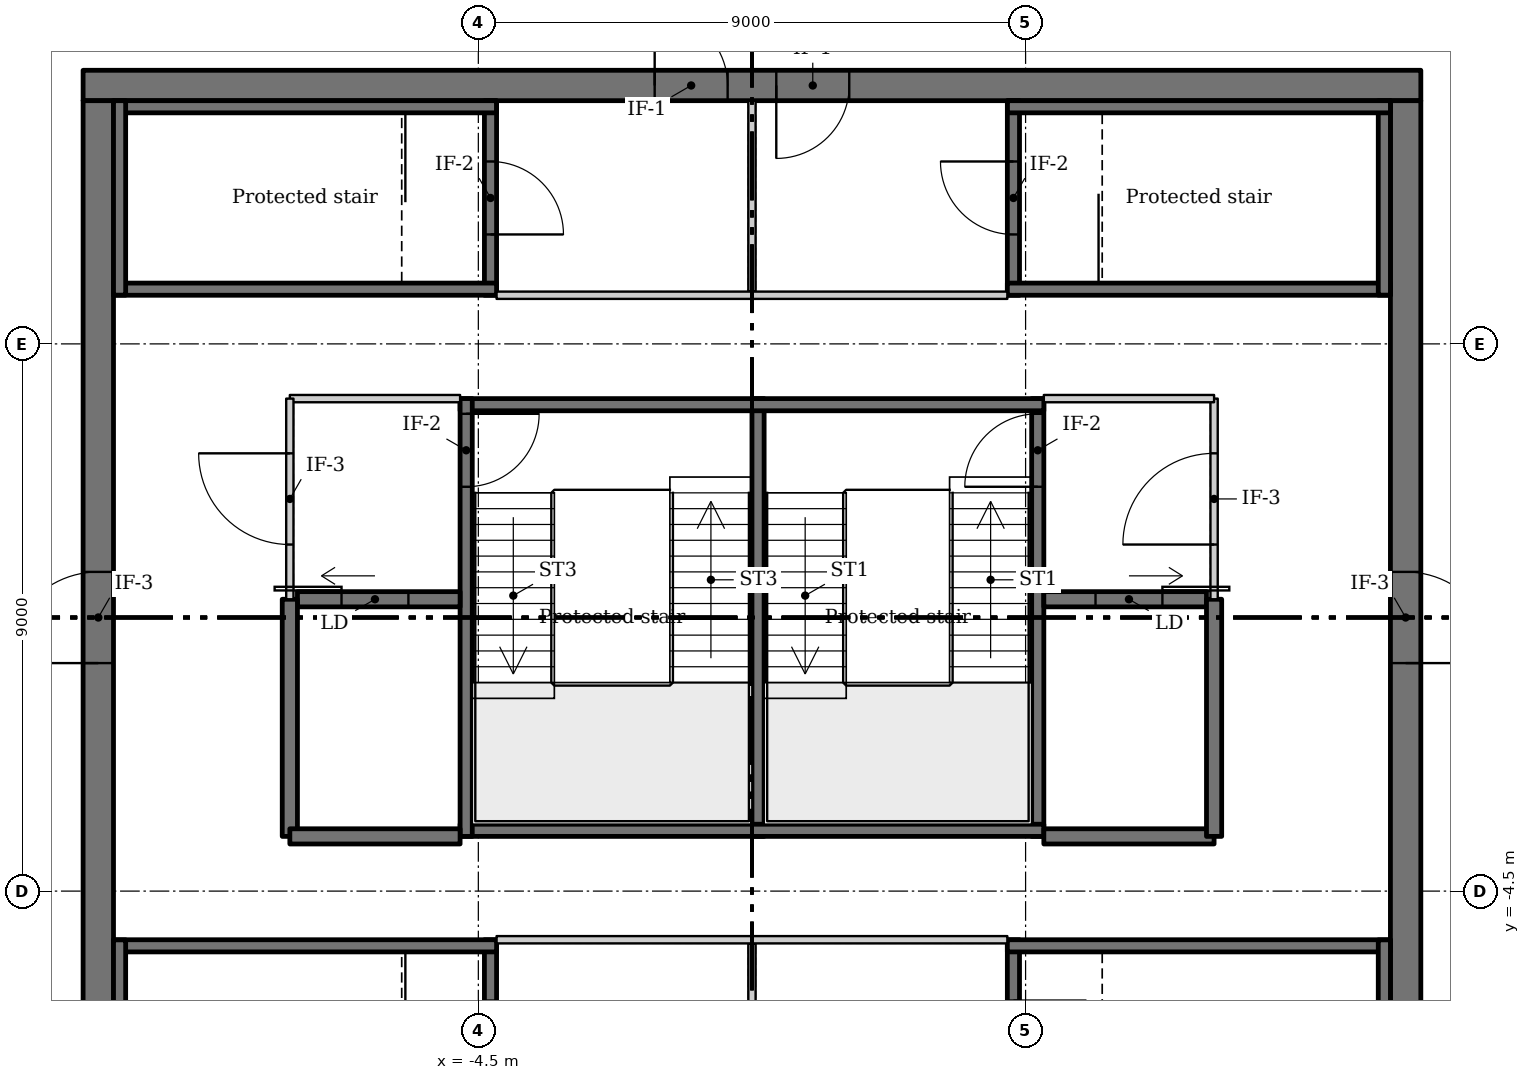
"""IFC4 building model, lengths in metres.
Left out: names, types, materials, properties, quantities, classifications, styles, units other than length and angle.
Written with IfcOpenShell. Run it as: python <this file> out.ifc"""

import sys

from ifc_helpers import new_model, si_unit, direction, frame, frame_2d, origin, place, context, subcontext, project, spatial, rectangle, extrude, source, transform, mapped, element, fill, save


model = new_model("IFC4")
c1 = context("Model", 3, precision=1e-05, world=origin(), true_north=direction((0.0, 1.0)))
c2 = subcontext(c1, "Body", "Model", "MODEL_VIEW")
j1 = project(units=[si_unit("LENGTHUNIT", "METRE"), si_unit("PLANEANGLEUNIT", "RADIAN")], contexts=[c1])
p1 = place(None, origin())
s1 = spatial("IfcSite", under=j1, at=p1, CompositionType="ELEMENT")
p2 = place(p1, origin())
s2 = spatial("IfcBuilding", under=s1, at=p2, CompositionType="ELEMENT")
p3 = place(p2, frame((0.0, 0.0, 352.0)))
s3 = spatial("IfcBuildingStorey", under=s2, at=p3, CompositionType="ELEMENT", Elevation=352.0)
m1 = source(origin(), c2, "Body", "SweptSolid", [
    extrude(rectangle(XDim=22.0, YDim=0.5, at=frame_2d((11.0, 0.0))), origin(), (0.0, 0.0, 1.0), 4.25),
])
p4 = place(p3, frame((-11.0, 8.75, -0.25), z_axis=(0.0, 0.0, 1.0), x_axis=(1.0, 0.0, 0.0)))
e1 = element("IfcWall", 1, at=p4, inside=s3, PredefinedType="SHEAR", context=c2, shape_type="MappedRepresentation", body=[
    mapped(m1, transform((0.0, 0.0, 0.0))),
])
m2 = source(origin(), c2, "Body", "SweptSolid", [
    extrude(rectangle(XDim=1.2, YDim=2.1, at=frame_2d((0.6, 1.05))), frame((0.0, 0.26, 0.0), z_axis=(0.0, -1.0, 0.0), x_axis=(1.0, 0.0, 0.0)), (0.0, 0.0, 1.0), 0.52),
])
p5 = place(p4, frame((9.4, 0.0, 0.25)))
e2 = element("IfcOpeningElement", 2, at=p5, cuts=e1, PredefinedType="OPENING", context=c2, shape_type="MappedRepresentation", body=[
    mapped(m2, transform((0.0, 0.0, 0.0))),
])
p6 = place(p4, frame((11.4, 0.0, 0.25)))
e3 = element("IfcOpeningElement", 3, at=p6, cuts=e1, PredefinedType="OPENING", context=c2, shape_type="MappedRepresentation", body=[
    mapped(m2, transform((0.0, 0.0, 0.0))),
])
m3 = source(origin(), c2, "Body", "SweptSolid", [
    extrude(rectangle(XDim=17.0, YDim=0.5, at=frame_2d((8.5, 0.0))), origin(), (0.0, 0.0, 1.0), 4.25),
])
p7 = place(p3, frame((10.75, -8.5, -0.25), z_axis=(0.0, 0.0, 1.0), x_axis=(0.0, 1.0, 0.0)))
e4 = element("IfcWall", 4, at=p7, inside=s3, PredefinedType="SHEAR", context=c2, shape_type="MappedRepresentation", body=[
    mapped(m3, transform((0.0, 0.0, 0.0))),
])
m4 = source(origin(), c2, "Body", "SweptSolid", [
    extrude(rectangle(XDim=1.5, YDim=2.1, at=frame_2d((0.75, 1.05))), frame((0.0, 0.26, 0.0), z_axis=(0.0, -1.0, 0.0), x_axis=(1.0, 0.0, 0.0)), (0.0, 0.0, 1.0), 0.52),
])
p8 = place(p7, frame((7.75, 0.0, 0.25)))
e5 = element("IfcOpeningElement", 5, at=p8, cuts=e4, PredefinedType="OPENING", context=c2, shape_type="MappedRepresentation", body=[
    mapped(m4, transform((0.0, 0.0, 0.0))),
])
p9 = place(p3, frame((-10.75, -8.5, -0.25), z_axis=(0.0, 0.0, 1.0), x_axis=(0.0, 1.0, 0.0)))
e6 = element("IfcWall", 6, at=p9, inside=s3, PredefinedType="SHEAR", context=c2, shape_type="MappedRepresentation", body=[
    mapped(m3, transform((0.0, 0.0, 0.0))),
])
p10 = place(p9, frame((7.75, 0.0, 0.25)))
e7 = element("IfcOpeningElement", 7, at=p10, cuts=e6, PredefinedType="OPENING", context=c2, shape_type="MappedRepresentation", body=[
    mapped(m4, transform((0.0, 0.0, 0.0))),
])
m5 = source(origin(), c2, "Body", "SweptSolid", [
    extrude(rectangle(XDim=7.2, YDim=0.2, at=frame_2d((3.6, 0.0))), origin(), (0.0, 0.0, 1.0), 4.0),
])
p11 = place(p3, frame((0.1, 3.6, 0.0), z_axis=(0.0, 0.0, 1.0), x_axis=(0.0, -1.0, 0.0)))
e8 = element("IfcWall", 8, at=p11, inside=s3, PredefinedType="SHEAR", context=c2, shape_type="MappedRepresentation", body=[
    mapped(m5, transform((0.0, 0.0, 0.0))),
])
p12 = place(p3, frame((4.7, -3.6, 0.0), z_axis=(0.0, 0.0, 1.0), x_axis=(0.0, 1.0, 0.0)))
e9 = element("IfcWall", 9, at=p12, inside=s3, PredefinedType="SHEAR", context=c2, shape_type="MappedRepresentation", body=[
    mapped(m5, transform((0.0, 0.0, 0.0))),
])
m6 = source(origin(), c2, "Body", "SweptSolid", [
    extrude(rectangle(XDim=1.2, YDim=2.1, at=frame_2d((0.6, 1.05))), frame((0.0, 0.11, 0.0), z_axis=(0.0, -1.0, 0.0), x_axis=(1.0, 0.0, 0.0)), (0.0, 0.0, 1.0), 0.22),
])
p13 = place(p12, frame((5.75, 0.0, 0.0)))
e10 = element("IfcOpeningElement", 10, at=p13, cuts=e9, PredefinedType="OPENING", context=c2, shape_type="MappedRepresentation", body=[
    mapped(m6, transform((0.0, 0.0, 0.0))),
])
m7 = source(origin(), c2, "Body", "SweptSolid", [
    extrude(rectangle(XDim=9.6, YDim=0.2, at=frame_2d((4.8, 0.0))), origin(), (0.0, 0.0, 1.0), 4.0),
])
for number, where, z_axis, x_axis in (
    (11, (-4.8, -3.5, 0.0), (0.0, 0.0, 1.0), (1.0, 0.0, 0.0)),
    (12, (4.8, 3.5, 0.0), (0.0, 0.0, 1.0), (-1.0, 0.0, 0.0)),
):
    element("IfcWall", number, at=place(p3, frame(where, z_axis=z_axis, x_axis=x_axis)), inside=s3, PredefinedType="SHEAR", context=c2, shape_type="MappedRepresentation", body=[
        mapped(m7, transform((0.0, 0.0, 0.0))),
    ])
p14 = place(p3, frame((-4.7, 3.6, 0.0), z_axis=(0.0, 0.0, 1.0), x_axis=(0.0, -1.0, 0.0)))
e13 = element("IfcWall", 13, at=p14, inside=s3, PredefinedType="SHEAR", context=c2, shape_type="MappedRepresentation", body=[
    mapped(m5, transform((0.0, 0.0, 0.0))),
])
p15 = place(p14, frame((0.25, 0.0, 0.0)))
e14 = element("IfcOpeningElement", 14, at=p15, cuts=e13, PredefinedType="OPENING", context=c2, shape_type="MappedRepresentation", body=[
    mapped(m6, transform((0.0, 0.0, 0.0))),
])
m8 = source(origin(), c2, "Body", "SweptSolid", [
    extrude(rectangle(XDim=2.675, YDim=0.25, at=frame_2d((1.337, 0.0))), origin(), (0.0, 0.0, 1.0), 4.0),
])
p16 = place(p3, frame((7.475, 0.3, 0.0), z_axis=(0.0, 0.0, 1.0), x_axis=(-1.0, 0.0, 0.0)))
e15 = element("IfcWall", 15, at=p16, inside=s3, PredefinedType="SHEAR", context=c2, shape_type="MappedRepresentation", body=[
    mapped(m8, transform((0.0, 0.0, 0.0))),
])
m9 = source(origin(), c2, "Body", "SweptSolid", [
    extrude(rectangle(XDim=1.1, YDim=2.1, at=frame_2d((0.55, 1.05))), frame((0.0, 0.135, 0.0), z_axis=(0.0, -1.0, 0.0), x_axis=(1.0, 0.0, 0.0)), (0.0, 0.0, 1.0), 0.27),
])
p17 = place(p16, frame((0.725, 0.0, 0.0)))
e16 = element("IfcOpeningElement", 16, at=p17, cuts=e15, PredefinedType="OPENING", context=c2, shape_type="MappedRepresentation", body=[
    mapped(m9, transform((0.0, 0.0, 0.0))),
])
m10 = source(origin(), c2, "Body", "SweptSolid", [
    extrude(rectangle(XDim=2.8, YDim=0.25, at=frame_2d((1.4, 0.0))), origin(), (0.0, 0.0, 1.0), 4.0),
])
p18 = place(p3, frame((4.8, -3.6, 0.0), z_axis=(0.0, 0.0, 1.0), x_axis=(1.0, 0.0, 0.0)))
e17 = element("IfcWall", 17, at=p18, inside=s3, PredefinedType="SHEAR", context=c2, shape_type="MappedRepresentation", body=[
    mapped(m10, transform((0.0, 0.0, 0.0))),
])
m11 = source(origin(), c2, "Body", "SweptSolid", [
    extrude(rectangle(XDim=3.9, YDim=0.25, at=frame_2d((1.95, 0.0))), origin(), (0.0, 0.0, 1.0), 4.0),
])
p19 = place(p3, frame((7.6, -3.6, 0.0), z_axis=(0.0, 0.0, 1.0), x_axis=(0.0, 1.0, 0.0)))
e18 = element("IfcWall", 18, at=p19, inside=s3, PredefinedType="SHEAR", context=c2, shape_type="MappedRepresentation", body=[
    mapped(m11, transform((0.0, 0.0, 0.0))),
])
m12 = source(origin(), c2, "Body", "SweptSolid", [
    extrude(rectangle(XDim=3.3, YDim=0.12, at=frame_2d((1.65, 0.0))), origin(), (0.0, 0.0, 1.0), 3.5),
])
p20 = place(p3, frame((7.6, 0.3, 0.0), z_axis=(0.0, 0.0, 1.0), x_axis=(0.0, 1.0, 0.0)))
e19 = element("IfcWall", 19, at=p20, inside=s3, PredefinedType="PARTITIONING", context=c2, shape_type="MappedRepresentation", body=[
    mapped(m12, transform((0.0, 0.0, 0.0))),
])
m13 = source(origin(), c2, "Body", "SweptSolid", [
    extrude(rectangle(XDim=1.5, YDim=2.1, at=frame_2d((0.75, 1.05))), frame((0.0, 0.07, 0.0), z_axis=(0.0, -1.0, 0.0), x_axis=(1.0, 0.0, 0.0)), (0.0, 0.0, 1.0), 0.14),
])
p21 = place(p20, frame((0.9, 0.0, 0.0)))
e20 = element("IfcOpeningElement", 20, at=p21, cuts=e19, PredefinedType="OPENING", context=c2, shape_type="MappedRepresentation", body=[
    mapped(m13, transform((0.0, 0.0, 0.0))),
])
m14 = source(origin(), c2, "Body", "SweptSolid", [
    extrude(rectangle(XDim=2.8, YDim=0.12, at=frame_2d((1.4, 0.0))), origin(), (0.0, 0.0, 1.0), 3.5),
])
p22 = place(p3, frame((7.6, 3.6, 0.0), z_axis=(0.0, 0.0, 1.0), x_axis=(-1.0, 0.0, 0.0)))
e21 = element("IfcWall", 21, at=p22, inside=s3, PredefinedType="PARTITIONING", context=c2, shape_type="MappedRepresentation", body=[
    mapped(m14, transform((0.0, 0.0, 0.0))),
])
p23 = place(p3, frame((-4.8, 0.3, 0.0), z_axis=(0.0, 0.0, 1.0), x_axis=(-1.0, 0.0, 0.0)))
e22 = element("IfcWall", 22, at=p23, inside=s3, PredefinedType="SHEAR", context=c2, shape_type="MappedRepresentation", body=[
    mapped(m8, transform((0.0, 0.0, 0.0))),
])
p24 = place(p23, frame((0.85, 0.0, 0.0)))
e23 = element("IfcOpeningElement", 23, at=p24, cuts=e22, PredefinedType="OPENING", context=c2, shape_type="MappedRepresentation", body=[
    mapped(m9, transform((0.0, 0.0, 0.0))),
])
p25 = place(p3, frame((-7.6, 0.3, 0.0), z_axis=(0.0, 0.0, 1.0), x_axis=(0.0, -1.0, 0.0)))
e24 = element("IfcWall", 24, at=p25, inside=s3, PredefinedType="SHEAR", context=c2, shape_type="MappedRepresentation", body=[
    mapped(m11, transform((0.0, 0.0, 0.0))),
])
p26 = place(p3, frame((-7.6, -3.6, 0.0), z_axis=(0.0, 0.0, 1.0), x_axis=(1.0, 0.0, 0.0)))
e25 = element("IfcWall", 25, at=p26, inside=s3, PredefinedType="SHEAR", context=c2, shape_type="MappedRepresentation", body=[
    mapped(m10, transform((0.0, 0.0, 0.0))),
])
p27 = place(p3, frame((-4.8, 3.6, 0.0), z_axis=(0.0, 0.0, 1.0), x_axis=(-1.0, 0.0, 0.0)))
e26 = element("IfcWall", 26, at=p27, inside=s3, PredefinedType="PARTITIONING", context=c2, shape_type="MappedRepresentation", body=[
    mapped(m14, transform((0.0, 0.0, 0.0))),
])
p28 = place(p3, frame((-7.6, 3.6, 0.0), z_axis=(0.0, 0.0, 1.0), x_axis=(0.0, -1.0, 0.0)))
e27 = element("IfcWall", 27, at=p28, inside=s3, PredefinedType="PARTITIONING", context=c2, shape_type="MappedRepresentation", body=[
    mapped(m12, transform((0.0, 0.0, 0.0))),
])
p29 = place(p28, frame((0.9, 0.0, 0.0)))
e28 = element("IfcOpeningElement", 28, at=p29, cuts=e27, PredefinedType="OPENING", context=c2, shape_type="MappedRepresentation", body=[
    mapped(m13, transform((0.0, 0.0, 0.0))),
])
m15 = source(origin(), c2, "Body", "SweptSolid", [
    extrude(rectangle(XDim=3.2, YDim=0.2, at=frame_2d((1.6, 0.0))), origin(), (0.0, 0.0, 1.0), 4.0),
])
p30 = place(p3, frame((-4.3, 5.3, 0.0), z_axis=(0.0, 0.0, 1.0), x_axis=(0.0, 1.0, 0.0)))
e29 = element("IfcWall", 29, at=p30, inside=s3, PredefinedType="SHEAR", context=c2, shape_type="MappedRepresentation", body=[
    mapped(m15, transform((0.0, 0.0, 0.0))),
])
p31 = place(p30, frame((1.0, 0.0, 0.0)))
e30 = element("IfcOpeningElement", 30, at=p31, cuts=e29, PredefinedType="OPENING", context=c2, shape_type="MappedRepresentation", body=[
    mapped(m6, transform((0.0, 0.0, 0.0))),
])
m16 = source(origin(), c2, "Body", "SweptSolid", [
    extrude(rectangle(XDim=6.3, YDim=0.2, at=frame_2d((3.15, 0.0))), origin(), (0.0, 0.0, 1.0), 4.0),
])
p32 = place(p3, frame((-10.5, 5.4, 0.0), z_axis=(0.0, 0.0, 1.0), x_axis=(1.0, 0.0, 0.0)))
e31 = element("IfcWall", 31, at=p32, inside=s3, PredefinedType="SHEAR", context=c2, shape_type="MappedRepresentation", body=[
    mapped(m16, transform((0.0, 0.0, 0.0))),
])
m17 = source(origin(), c2, "Body", "SweptSolid", [
    extrude(rectangle(XDim=3.14, YDim=0.12, at=frame_2d((1.57, 0.0))), origin(), (0.0, 0.0, 1.0), 3.5),
])
p33 = place(p3, frame((0.0, 5.36, 0.0), z_axis=(0.0, 0.0, 1.0), x_axis=(0.0, 1.0, 0.0)))
e32 = element("IfcWall", 32, at=p33, inside=s3, PredefinedType="PARTITIONING", context=c2, shape_type="MappedRepresentation", body=[
    mapped(m17, transform((0.0, 0.0, 0.0))),
])
m18 = source(origin(), c2, "Body", "SweptSolid", [
    extrude(rectangle(XDim=8.4, YDim=0.12, at=frame_2d((4.2, 0.0))), origin(), (0.0, 0.0, 1.0), 3.5),
])
p34 = place(p3, frame((-4.2, 5.3, 0.0), z_axis=(0.0, 0.0, 1.0), x_axis=(1.0, 0.0, 0.0)))
e33 = element("IfcWall", 33, at=p34, inside=s3, PredefinedType="PARTITIONING", context=c2, shape_type="MappedRepresentation", body=[
    mapped(m18, transform((0.0, 0.0, 0.0))),
])
p35 = place(p3, frame((4.3, 8.5, 0.0), z_axis=(0.0, 0.0, 1.0), x_axis=(0.0, -1.0, 0.0)))
e34 = element("IfcWall", 34, at=p35, inside=s3, PredefinedType="SHEAR", context=c2, shape_type="MappedRepresentation", body=[
    mapped(m15, transform((0.0, 0.0, 0.0))),
])
p36 = place(p35, frame((1.0, 0.0, 0.0)))
e35 = element("IfcOpeningElement", 35, at=p36, cuts=e34, PredefinedType="OPENING", context=c2, shape_type="MappedRepresentation", body=[
    mapped(m6, transform((0.0, 0.0, 0.0))),
])
p37 = place(p3, frame((4.2, 5.4, 0.0), z_axis=(0.0, 0.0, 1.0), x_axis=(1.0, 0.0, 0.0)))
e36 = element("IfcWall", 36, at=p37, inside=s3, PredefinedType="SHEAR", context=c2, shape_type="MappedRepresentation", body=[
    mapped(m16, transform((0.0, 0.0, 0.0))),
])
p38 = place(p3, frame((-4.3, -8.5, 0.0), z_axis=(0.0, 0.0, 1.0), x_axis=(0.0, 1.0, 0.0)))
e37 = element("IfcWall", 37, at=p38, inside=s3, PredefinedType="SHEAR", context=c2, shape_type="MappedRepresentation", body=[
    mapped(m15, transform((0.0, 0.0, 0.0))),
])
p39 = place(p38, frame((1.0, 0.0, 0.0)))
e38 = element("IfcOpeningElement", 38, at=p39, cuts=e37, PredefinedType="OPENING", context=c2, shape_type="MappedRepresentation", body=[
    mapped(m6, transform((0.0, 0.0, 0.0))),
])
p40 = place(p3, frame((-4.2, -5.4, 0.0), z_axis=(0.0, 0.0, 1.0), x_axis=(-1.0, 0.0, 0.0)))
e39 = element("IfcWall", 39, at=p40, inside=s3, PredefinedType="SHEAR", context=c2, shape_type="MappedRepresentation", body=[
    mapped(m16, transform((0.0, 0.0, 0.0))),
])
p41 = place(p3, frame((0.0, -8.5, 0.0), z_axis=(0.0, 0.0, 1.0), x_axis=(0.0, 1.0, 0.0)))
e40 = element("IfcWall", 40, at=p41, inside=s3, PredefinedType="PARTITIONING", context=c2, shape_type="MappedRepresentation", body=[
    mapped(m17, transform((0.0, 0.0, 0.0))),
])
p42 = place(p3, frame((4.2, -5.3, 0.0), z_axis=(0.0, 0.0, 1.0), x_axis=(-1.0, 0.0, 0.0)))
e41 = element("IfcWall", 41, at=p42, inside=s3, PredefinedType="PARTITIONING", context=c2, shape_type="MappedRepresentation", body=[
    mapped(m18, transform((0.0, 0.0, 0.0))),
])
p43 = place(p3, frame((4.3, -5.3, 0.0), z_axis=(0.0, 0.0, 1.0), x_axis=(0.0, -1.0, 0.0)))
e42 = element("IfcWall", 42, at=p43, inside=s3, PredefinedType="SHEAR", context=c2, shape_type="MappedRepresentation", body=[
    mapped(m15, transform((0.0, 0.0, 0.0))),
])
p44 = place(p43, frame((1.0, 0.0, 0.0)))
e43 = element("IfcOpeningElement", 43, at=p44, cuts=e42, PredefinedType="OPENING", context=c2, shape_type="MappedRepresentation", body=[
    mapped(m6, transform((0.0, 0.0, 0.0))),
])
p45 = place(p3, frame((10.5, -5.4, 0.0), z_axis=(0.0, 0.0, 1.0), x_axis=(-1.0, 0.0, 0.0)))
e44 = element("IfcWall", 44, at=p45, inside=s3, PredefinedType="SHEAR", context=c2, shape_type="MappedRepresentation", body=[
    mapped(m16, transform((0.0, 0.0, 0.0))),
])
m19 = source(origin(), c2, "Body", "SweptSolid", [
    extrude(rectangle(XDim=6.298, YDim=0.2, at=frame_2d((3.149, 0.0))), origin(), (0.0, 0.0, 1.0), 4.0),
])
p46 = place(p3, frame((-4.202, 8.4, 0.0), z_axis=(0.0, 0.0, 1.0), x_axis=(-1.0, 0.0, 0.0)))
e45 = element("IfcWall", 45, at=p46, inside=s3, PredefinedType="SHEAR", context=c2, shape_type="MappedRepresentation", body=[
    mapped(m19, transform((0.0, 0.0, 0.0))),
])
m20 = source(origin(), c2, "Body", "SweptSolid", [
    extrude(rectangle(XDim=3.198, YDim=0.2, at=frame_2d((1.599, 0.0))), origin(), (0.0, 0.0, 1.0), 4.0),
])
for number, where, z_axis, x_axis in (
    (46, (-10.4, 8.5, 0.0), (0.0, 0.0, 1.0), (0.0, -1.0, 0.0)),
    (47, (10.4, 5.302, 0.0), (0.0, 0.0, 1.0), (0.0, 1.0, 0.0)),
):
    element("IfcWall", number, at=place(p3, frame(where, z_axis=z_axis, x_axis=x_axis)), inside=s3, PredefinedType="SHEAR", context=c2, shape_type="MappedRepresentation", body=[
        mapped(m20, transform((0.0, 0.0, 0.0))),
    ])
p47 = place(p3, frame((10.5, 8.4, 0.0), z_axis=(0.0, 0.0, 1.0), x_axis=(-1.0, 0.0, 0.0)))
e48 = element("IfcWall", 48, at=p47, inside=s3, PredefinedType="SHEAR", context=c2, shape_type="MappedRepresentation", body=[
    mapped(m19, transform((0.0, 0.0, 0.0))),
])
for number, where, z_axis, x_axis in (
    (49, (-10.4, -5.302, 0.0), (0.0, 0.0, 1.0), (0.0, -1.0, 0.0)),
    (50, (10.4, -8.5, 0.0), (0.0, 0.0, 1.0), (0.0, 1.0, 0.0)),
):
    element("IfcWall", number, at=place(p3, frame(where, z_axis=z_axis, x_axis=x_axis)), inside=s3, PredefinedType="SHEAR", context=c2, shape_type="MappedRepresentation", body=[
        mapped(m20, transform((0.0, 0.0, 0.0))),
    ])
m21 = source(origin(), c2, "Body", "SweptSolid", [
    extrude(rectangle(XDim=1.1, YDim=2.1, at=frame_2d((0.55, 1.05))), frame((0.0, 0.025, 0.0), z_axis=(0.0, -1.0, 0.0), x_axis=(1.0, 0.0, 0.0)), (0.0, 0.0, 1.0), 0.05),
])
p48 = place(p17, origin())
e51 = element("IfcDoor", 51, at=p48, inside=s3, OperationType="SLIDING_TO_LEFT", PredefinedType="DOOR", context=c2, shape_type="MappedRepresentation", body=[
    mapped(m21, transform((0.0, 0.0, 0.0))),
])
fill(e16, e51)
m22 = source(origin(), c2, "Body", "SweptSolid", [
    extrude(rectangle(XDim=1.2, YDim=2.1, at=frame_2d((0.6, 1.05))), frame((0.0, 0.025, 0.0), z_axis=(0.0, -1.0, 0.0), x_axis=(1.0, 0.0, 0.0)), (0.0, 0.0, 1.0), 0.05),
])
p49 = place(p13, origin())
e52 = element("IfcDoor", 52, at=p49, inside=s3, OperationType="SINGLE_SWING_RIGHT", PredefinedType="DOOR", context=c2, shape_type="MappedRepresentation", body=[
    mapped(m22, transform((0.0, 0.0, 0.0))),
])
fill(e10, e52)
p50 = place(p24, origin())
e53 = element("IfcDoor", 53, at=p50, inside=s3, OperationType="SLIDING_TO_RIGHT", PredefinedType="DOOR", context=c2, shape_type="MappedRepresentation", body=[
    mapped(m21, transform((0.0, 0.0, 0.0))),
])
fill(e23, e53)
p51 = place(p15, origin())
e54 = element("IfcDoor", 54, at=p51, inside=s3, OperationType="SINGLE_SWING_RIGHT", PredefinedType="DOOR", context=c2, shape_type="MappedRepresentation", body=[
    mapped(m22, transform((0.0, 0.0, 0.0))),
])
fill(e14, e54)
p52 = place(p31, origin())
e55 = element("IfcDoor", 55, at=p52, inside=s3, OperationType="SINGLE_SWING_RIGHT", PredefinedType="DOOR", context=c2, shape_type="MappedRepresentation", body=[
    mapped(m22, transform((0.0, 0.0, 0.0))),
])
fill(e30, e55)
p53 = place(p5, origin())
e56 = element("IfcDoor", 56, at=p53, inside=s3, OperationType="SINGLE_SWING_LEFT", PredefinedType="DOOR", context=c2, shape_type="MappedRepresentation", body=[
    mapped(m22, transform((0.0, 0.0, 0.0))),
])
fill(e2, e56)
p54 = place(p36, origin())
e57 = element("IfcDoor", 57, at=p54, inside=s3, OperationType="SINGLE_SWING_LEFT", PredefinedType="DOOR", context=c2, shape_type="MappedRepresentation", body=[
    mapped(m22, transform((0.0, 0.0, 0.0))),
])
fill(e35, e57)
p55 = place(p6, origin())
e58 = element("IfcDoor", 58, at=p55, inside=s3, OperationType="SINGLE_SWING_RIGHT", PredefinedType="DOOR", context=c2, shape_type="MappedRepresentation", body=[
    mapped(m22, transform((0.0, 0.0, 0.0))),
])
fill(e3, e58)
p56 = place(p39, origin())
e59 = element("IfcDoor", 59, at=p56, inside=s3, OperationType="SINGLE_SWING_RIGHT", PredefinedType="DOOR", context=c2, shape_type="MappedRepresentation", body=[
    mapped(m22, transform((0.0, 0.0, 0.0))),
])
fill(e38, e59)
m23 = source(origin(), c2, "Body", "SweptSolid", [
    extrude(rectangle(XDim=1.5, YDim=2.1, at=frame_2d((0.75, 1.05))), frame((0.0, 0.025, 0.0), z_axis=(0.0, -1.0, 0.0), x_axis=(1.0, 0.0, 0.0)), (0.0, 0.0, 1.0), 0.05),
])
p57 = place(p10, origin())
e60 = element("IfcDoor", 60, at=p57, inside=s3, OperationType="DOUBLE_DOOR_SINGLE_SWING", PredefinedType="DOOR", context=c2, shape_type="MappedRepresentation", body=[
    mapped(m23, transform((0.0, 0.0, 0.0))),
])
fill(e7, e60)
p58 = place(p8, origin())
e61 = element("IfcDoor", 61, at=p58, inside=s3, OperationType="DOUBLE_DOOR_SINGLE_SWING", PredefinedType="DOOR", context=c2, shape_type="MappedRepresentation", body=[
    mapped(m23, transform((0.0, 0.0, 0.0))),
])
fill(e5, e61)
p59 = place(p21, origin())
e62 = element("IfcDoor", 62, at=p59, inside=s3, OperationType="DOUBLE_DOOR_SINGLE_SWING", PredefinedType="DOOR", context=c2, shape_type="MappedRepresentation", body=[
    mapped(m23, transform((0.0, 0.0, 0.0))),
])
fill(e20, e62)
p60 = place(p29, origin())
e63 = element("IfcDoor", 63, at=p60, inside=s3, OperationType="DOUBLE_DOOR_SINGLE_SWING", PredefinedType="DOOR", context=c2, shape_type="MappedRepresentation", body=[
    mapped(m23, transform((0.0, 0.0, 0.0))),
])
fill(e28, e63)
save(model, sys.argv[1])
